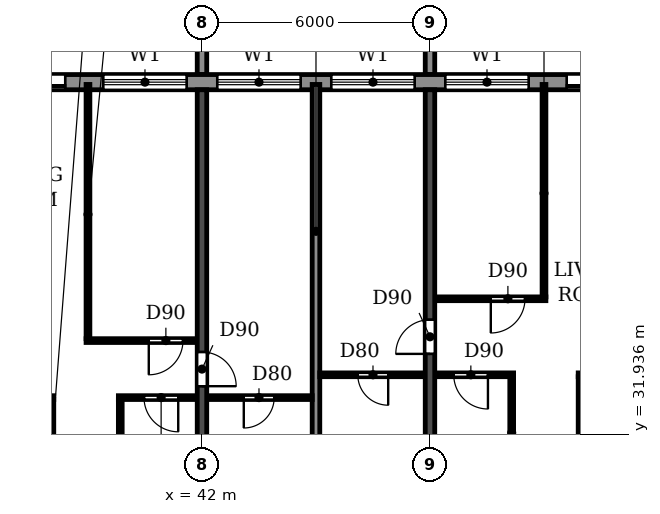
"""IFC4 building model, lengths in metres.
Left out: names, types, materials, properties, quantities, classifications, styles, units other than length and angle.
Written with IfcOpenShell. Run it as: python <this file> out.ifc"""

import sys

from ifc_helpers import new_model, si_unit, direction, frame, frame_2d, origin, place, context, subcontext, project, spatial, polyline, rectangle, outline, extrude, source, transform, mapped, element, fill, save


model = new_model("IFC4")
c1 = context("Model", 3, precision=1e-05, world=origin(), true_north=direction((0.0, 1.0)))
c2 = subcontext(c1, "Body", "Model", "MODEL_VIEW")
j1 = project(units=[si_unit("LENGTHUNIT", "METRE"), si_unit("PLANEANGLEUNIT", "RADIAN")], contexts=[c1])
p1 = place(None, origin())
s1 = spatial("IfcSite", under=j1, at=p1, CompositionType="ELEMENT")
p2 = place(p1, origin())
s2 = spatial("IfcBuilding", under=s1, at=p2, CompositionType="ELEMENT")
p3 = place(p2, frame((0.0, 0.0, 171.9)))
s3 = spatial("IfcBuildingStorey", under=s2, at=p3, CompositionType="ELEMENT", Elevation=171.9)
p4 = place(p3, frame((42.0, 30.5, 0.0), z_axis=(0.0, 0.0, 1.0), x_axis=(0.0, 1.0, 0.0)))
e1 = element("IfcWall", 1, at=p4, inside=s3, PredefinedType="SHEAR", context=c2, shape_type="SweptSolid", body=[
    extrude(rectangle(XDim=10.5, YDim=0.25, at=frame_2d((5.25, 0.0))), origin(), (0.0, 0.0, 1.0), 3.08),
])
p5 = place(p4, frame((2.7, 0.0, 0.0)))
e2 = element("IfcOpeningElement", 2, at=p5, cuts=e1, PredefinedType="OPENING", context=c2, shape_type="SweptSolid", body=[
    extrude(rectangle(XDim=0.9, YDim=2.1, at=frame_2d((0.45, 1.05))), frame((0.0, 0.135, 0.0), z_axis=(0.0, -1.0, 0.0), x_axis=(1.0, 0.0, 0.0)), (0.0, 0.0, 1.0), 0.27),
])
p6 = place(p3, frame((48.0, 30.5, 0.0), z_axis=(0.0, 0.0, 1.0), x_axis=(0.0, 1.0, 0.0)))
e3 = element("IfcWall", 3, at=p6, inside=s3, PredefinedType="SHEAR", context=c2, shape_type="SweptSolid", body=[
    extrude(rectangle(XDim=10.5, YDim=0.25, at=frame_2d((5.25, 0.0))), origin(), (0.0, 0.0, 1.0), 3.08),
])
p7 = place(p6, frame((3.55, 0.0, 0.0)))
e4 = element("IfcOpeningElement", 4, at=p7, cuts=e3, PredefinedType="OPENING", context=c2, shape_type="SweptSolid", body=[
    extrude(rectangle(XDim=0.9, YDim=2.1, at=frame_2d((0.45, 1.05))), frame((0.0, 0.135, 0.0), z_axis=(0.0, -1.0, 0.0), x_axis=(1.0, 0.0, 0.0)), (0.0, 0.0, 1.0), 0.27),
])
p8 = place(p3, frame((79.317, 41.2, 0.0), z_axis=(0.0, 0.0, 1.0), x_axis=(-1.0, 0.0, 0.0)))
e5 = element("IfcWall", 5, at=p8, inside=s3, PredefinedType="STANDARD", context=c2, shape_type="SweptSolid", body=[
    extrude(rectangle(XDim=56.634, YDim=0.4, at=frame_2d((28.317, 0.0))), origin(), (0.0, 0.0, 1.0), 3.08),
])
p9 = place(p8, frame((52.717, 0.0, 0.9)))
e6 = element("IfcOpeningElement", 6, at=p9, cuts=e5, PredefinedType="OPENING", context=c2, shape_type="SweptSolid", body=[
    extrude(rectangle(XDim=2.2, YDim=1.5, at=frame_2d((1.1, 0.75))), frame((0.0, 0.21, 0.0), z_axis=(0.0, -1.0, 0.0), x_axis=(1.0, 0.0, 0.0)), (0.0, 0.0, 1.0), 0.42),
])
p10 = place(p8, frame((49.917, 0.0, 0.0)))
e7 = element("IfcOpeningElement", 7, at=p10, cuts=e5, PredefinedType="OPENING", context=c2, shape_type="SweptSolid", body=[
    extrude(rectangle(XDim=1.8, YDim=2.4, at=frame_2d((0.9, 1.2))), frame((0.0, 0.21, 0.0), z_axis=(0.0, -1.0, 0.0), x_axis=(1.0, 0.0, 0.0)), (0.0, 0.0, 1.0), 0.42),
])
p11 = place(p8, frame((46.717, 0.0, 0.9)))
e8 = element("IfcOpeningElement", 8, at=p11, cuts=e5, PredefinedType="OPENING", context=c2, shape_type="SweptSolid", body=[
    extrude(rectangle(XDim=2.2, YDim=1.5, at=frame_2d((1.1, 0.75))), frame((0.0, 0.21, 0.0), z_axis=(0.0, -1.0, 0.0), x_axis=(1.0, 0.0, 0.0)), (0.0, 0.0, 1.0), 0.42),
])
p12 = place(p8, frame((43.717, 0.0, 0.9)))
e9 = element("IfcOpeningElement", 9, at=p12, cuts=e5, PredefinedType="OPENING", context=c2, shape_type="SweptSolid", body=[
    extrude(rectangle(XDim=2.2, YDim=1.5, at=frame_2d((1.1, 0.75))), frame((0.0, 0.21, 0.0), z_axis=(0.0, -1.0, 0.0), x_axis=(1.0, 0.0, 0.0)), (0.0, 0.0, 1.0), 0.42),
])
p13 = place(p8, frame((40.917, 0.0, 0.0)))
e10 = element("IfcOpeningElement", 10, at=p13, cuts=e5, PredefinedType="OPENING", context=c2, shape_type="SweptSolid", body=[
    extrude(rectangle(XDim=1.8, YDim=2.4, at=frame_2d((0.9, 1.2))), frame((0.0, 0.21, 0.0), z_axis=(0.0, -1.0, 0.0), x_axis=(1.0, 0.0, 0.0)), (0.0, 0.0, 1.0), 0.42),
])
p14 = place(p8, frame((37.717, 0.0, 0.9)))
e11 = element("IfcOpeningElement", 11, at=p14, cuts=e5, PredefinedType="OPENING", context=c2, shape_type="SweptSolid", body=[
    extrude(rectangle(XDim=2.2, YDim=1.5, at=frame_2d((1.1, 0.75))), frame((0.0, 0.21, 0.0), z_axis=(0.0, -1.0, 0.0), x_axis=(1.0, 0.0, 0.0)), (0.0, 0.0, 1.0), 0.42),
])
p15 = place(p8, frame((34.717, 0.0, 0.9)))
e12 = element("IfcOpeningElement", 12, at=p15, cuts=e5, PredefinedType="OPENING", context=c2, shape_type="SweptSolid", body=[
    extrude(rectangle(XDim=2.2, YDim=1.5, at=frame_2d((1.1, 0.75))), frame((0.0, 0.21, 0.0), z_axis=(0.0, -1.0, 0.0), x_axis=(1.0, 0.0, 0.0)), (0.0, 0.0, 1.0), 0.42),
])
p16 = place(p8, frame((31.717, 0.0, 0.9)))
e13 = element("IfcOpeningElement", 13, at=p16, cuts=e5, PredefinedType="OPENING", context=c2, shape_type="SweptSolid", body=[
    extrude(rectangle(XDim=2.2, YDim=1.5, at=frame_2d((1.1, 0.75))), frame((0.0, 0.21, 0.0), z_axis=(0.0, -1.0, 0.0), x_axis=(1.0, 0.0, 0.0)), (0.0, 0.0, 1.0), 0.42),
])
p17 = place(p8, frame((28.717, 0.0, 0.9)))
e14 = element("IfcOpeningElement", 14, at=p17, cuts=e5, PredefinedType="OPENING", context=c2, shape_type="SweptSolid", body=[
    extrude(rectangle(XDim=2.2, YDim=1.5, at=frame_2d((1.1, 0.75))), frame((0.0, 0.21, 0.0), z_axis=(0.0, -1.0, 0.0), x_axis=(1.0, 0.0, 0.0)), (0.0, 0.0, 1.0), 0.42),
])
p18 = place(p8, frame((25.917, 0.0, 0.0)))
e15 = element("IfcOpeningElement", 15, at=p18, cuts=e5, PredefinedType="OPENING", context=c2, shape_type="SweptSolid", body=[
    extrude(rectangle(XDim=1.8, YDim=2.4, at=frame_2d((0.9, 1.2))), frame((0.0, 0.21, 0.0), z_axis=(0.0, -1.0, 0.0), x_axis=(1.0, 0.0, 0.0)), (0.0, 0.0, 1.0), 0.42),
])
p19 = place(p8, frame((22.717, 0.0, 0.9)))
e16 = element("IfcOpeningElement", 16, at=p19, cuts=e5, PredefinedType="OPENING", context=c2, shape_type="SweptSolid", body=[
    extrude(rectangle(XDim=2.2, YDim=1.5, at=frame_2d((1.1, 0.75))), frame((0.0, 0.21, 0.0), z_axis=(0.0, -1.0, 0.0), x_axis=(1.0, 0.0, 0.0)), (0.0, 0.0, 1.0), 0.42),
])
p20 = place(p8, frame((19.917, 0.0, 0.0)))
e17 = element("IfcOpeningElement", 17, at=p20, cuts=e5, PredefinedType="OPENING", context=c2, shape_type="SweptSolid", body=[
    extrude(rectangle(XDim=1.8, YDim=2.4, at=frame_2d((0.9, 1.2))), frame((0.0, 0.21, 0.0), z_axis=(0.0, -1.0, 0.0), x_axis=(1.0, 0.0, 0.0)), (0.0, 0.0, 1.0), 0.42),
])
p21 = place(p8, frame((16.717, 0.0, 0.9)))
e18 = element("IfcOpeningElement", 18, at=p21, cuts=e5, PredefinedType="OPENING", context=c2, shape_type="SweptSolid", body=[
    extrude(rectangle(XDim=2.2, YDim=1.5, at=frame_2d((1.1, 0.75))), frame((0.0, 0.21, 0.0), z_axis=(0.0, -1.0, 0.0), x_axis=(1.0, 0.0, 0.0)), (0.0, 0.0, 1.0), 0.42),
])
p22 = place(p8, frame((13.717, 0.0, 0.9)))
e19 = element("IfcOpeningElement", 19, at=p22, cuts=e5, PredefinedType="OPENING", context=c2, shape_type="SweptSolid", body=[
    extrude(rectangle(XDim=2.2, YDim=1.5, at=frame_2d((1.1, 0.75))), frame((0.0, 0.21, 0.0), z_axis=(0.0, -1.0, 0.0), x_axis=(1.0, 0.0, 0.0)), (0.0, 0.0, 1.0), 0.42),
])
p23 = place(p8, frame((10.917, 0.0, 0.0)))
e20 = element("IfcOpeningElement", 20, at=p23, cuts=e5, PredefinedType="OPENING", context=c2, shape_type="SweptSolid", body=[
    extrude(rectangle(XDim=1.8, YDim=2.4, at=frame_2d((0.9, 1.2))), frame((0.0, 0.21, 0.0), z_axis=(0.0, -1.0, 0.0), x_axis=(1.0, 0.0, 0.0)), (0.0, 0.0, 1.0), 0.42),
])
p24 = place(p8, frame((7.717, 0.0, 0.9)))
e21 = element("IfcOpeningElement", 21, at=p24, cuts=e5, PredefinedType="OPENING", context=c2, shape_type="SweptSolid", body=[
    extrude(rectangle(XDim=2.2, YDim=1.5, at=frame_2d((1.1, 0.75))), frame((0.0, 0.21, 0.0), z_axis=(0.0, -1.0, 0.0), x_axis=(1.0, 0.0, 0.0)), (0.0, 0.0, 1.0), 0.42),
])
p25 = place(p8, frame((4.717, 0.0, 0.9)))
e22 = element("IfcOpeningElement", 22, at=p25, cuts=e5, PredefinedType="OPENING", context=c2, shape_type="SweptSolid", body=[
    extrude(rectangle(XDim=2.2, YDim=1.5, at=frame_2d((1.1, 0.75))), frame((0.0, 0.21, 0.0), z_axis=(0.0, -1.0, 0.0), x_axis=(1.0, 0.0, 0.0)), (0.0, 0.0, 1.0), 0.42),
])
p26 = place(p8, frame((1.917, 0.0, 0.0)))
e23 = element("IfcOpeningElement", 23, at=p26, cuts=e5, PredefinedType="OPENING", context=c2, shape_type="SweptSolid", body=[
    extrude(rectangle(XDim=1.8, YDim=2.4, at=frame_2d((0.9, 1.2))), frame((0.0, 0.21, 0.0), z_axis=(0.0, -1.0, 0.0), x_axis=(1.0, 0.0, 0.0)), (0.0, 0.0, 1.0), 0.42),
])
m1 = source(origin(), c2, "Body", "SweptSolid", [
    extrude(outline(polyline([(0.0, 0.0), (0.25, 0.0), (0.25, 3.1), (0.0, 3.1), (0.0, 0.0)])), origin(), (0.0, 0.0, 1.0), 3.1),
])
for number, where in (
    (24, (41.875, 41.4, 0.0)),
    (25, (47.875, 41.4, 0.0)),
):
    element("IfcWall", number, at=place(p3, frame(where)), inside=s3, PredefinedType="STANDARD", context=c2, shape_type="MappedRepresentation", body=[
        mapped(m1, transform((0.0, 0.0, 0.0))),
    ])
p27 = place(p3, frame((45.0, 30.51, 0.0), z_axis=(0.0, 0.0, 1.0), x_axis=(0.0, 1.0, 0.0)))
e26 = element("IfcWall", 26, at=p27, inside=s3, PredefinedType="PARTITIONING", context=c2, shape_type="SweptSolid", body=[
    extrude(rectangle(XDim=10.63, YDim=0.2, at=frame_2d((5.315, 0.0))), origin(), (0.0, 0.0, 1.0), 3.08),
])
p28 = place(p3, frame((36.135, 32.9, 0.0), z_axis=(0.0, 0.0, 1.0), x_axis=(1.0, 0.0, 0.0)))
e27 = element("IfcWall", 27, at=p28, inside=s3, PredefinedType="PARTITIONING", context=c2, shape_type="SweptSolid", body=[
    extrude(rectangle(XDim=1.965, YDim=0.1, at=frame_2d((0.982, 0.0))), origin(), (0.0, 0.0, 1.0), 3.08),
])
p29 = place(p28, frame((0.49, 0.0, 0.0)))
e28 = element("IfcOpeningElement", 28, at=p29, cuts=e27, PredefinedType="OPENING", context=c2, shape_type="SweptSolid", body=[
    extrude(rectangle(XDim=0.8, YDim=2.1, at=frame_2d((0.4, 1.05))), frame((0.0, 0.06, 0.0), z_axis=(0.0, -1.0, 0.0), x_axis=(1.0, 0.0, 0.0)), (0.0, 0.0, 1.0), 0.12),
])
p30 = place(p3, frame((39.8, 32.9, 0.0), z_axis=(0.0, 0.0, 1.0), x_axis=(1.0, 0.0, 0.0)))
e29 = element("IfcWall", 29, at=p30, inside=s3, PredefinedType="PARTITIONING", context=c2, shape_type="SweptSolid", body=[
    extrude(rectangle(XDim=2.065, YDim=0.1, at=frame_2d((1.032, 0.0))), origin(), (0.0, 0.0, 1.0), 3.08),
])
p31 = place(p30, frame((0.675, 0.0, 0.0)))
e30 = element("IfcOpeningElement", 30, at=p31, cuts=e29, PredefinedType="OPENING", context=c2, shape_type="SweptSolid", body=[
    extrude(rectangle(XDim=0.9, YDim=2.1, at=frame_2d((0.45, 1.05))), frame((0.0, 0.06, 0.0), z_axis=(0.0, -1.0, 0.0), x_axis=(1.0, 0.0, 0.0)), (0.0, 0.0, 1.0), 0.12),
])
p32 = place(p3, frame((42.135, 32.9, 0.0), z_axis=(0.0, 0.0, 1.0), x_axis=(1.0, 0.0, 0.0)))
e31 = element("IfcWall", 31, at=p32, inside=s3, PredefinedType="PARTITIONING", context=c2, shape_type="SweptSolid", body=[
    extrude(rectangle(XDim=2.765, YDim=0.1, at=frame_2d((1.382, 0.0))), origin(), (0.0, 0.0, 1.0), 3.08),
])
p33 = place(p32, frame((0.965, 0.0, 0.0)))
e32 = element("IfcOpeningElement", 32, at=p33, cuts=e31, PredefinedType="OPENING", context=c2, shape_type="SweptSolid", body=[
    extrude(rectangle(XDim=0.8, YDim=2.1, at=frame_2d((0.4, 1.05))), frame((0.0, 0.06, 0.0), z_axis=(0.0, -1.0, 0.0), x_axis=(1.0, 0.0, 0.0)), (0.0, 0.0, 1.0), 0.12),
])
p34 = place(p3, frame((45.1, 33.5, 0.0), z_axis=(0.0, 0.0, 1.0), x_axis=(1.0, 0.0, 0.0)))
e33 = element("IfcWall", 33, at=p34, inside=s3, PredefinedType="PARTITIONING", context=c2, shape_type="SweptSolid", body=[
    extrude(rectangle(XDim=2.765, YDim=0.1, at=frame_2d((1.382, 0.0))), origin(), (0.0, 0.0, 1.0), 3.08),
])
p35 = place(p34, frame((1.0, 0.0, 0.0)))
e34 = element("IfcOpeningElement", 34, at=p35, cuts=e33, PredefinedType="OPENING", context=c2, shape_type="SweptSolid", body=[
    extrude(rectangle(XDim=0.8, YDim=2.1, at=frame_2d((0.4, 1.05))), frame((0.0, 0.06, 0.0), z_axis=(0.0, -1.0, 0.0), x_axis=(1.0, 0.0, 0.0)), (0.0, 0.0, 1.0), 0.12),
])
p36 = place(p3, frame((48.135, 33.5, 0.0), z_axis=(0.0, 0.0, 1.0), x_axis=(1.0, 0.0, 0.0)))
e35 = element("IfcWall", 35, at=p36, inside=s3, PredefinedType="PARTITIONING", context=c2, shape_type="SweptSolid", body=[
    extrude(rectangle(XDim=2.065, YDim=0.1, at=frame_2d((1.032, 0.0))), origin(), (0.0, 0.0, 1.0), 3.08),
])
p37 = place(p36, frame((0.49, 0.0, 0.0)))
e36 = element("IfcOpeningElement", 36, at=p37, cuts=e35, PredefinedType="OPENING", context=c2, shape_type="SweptSolid", body=[
    extrude(rectangle(XDim=0.9, YDim=2.1, at=frame_2d((0.45, 1.05))), frame((0.0, 0.06, 0.0), z_axis=(0.0, -1.0, 0.0), x_axis=(1.0, 0.0, 0.0)), (0.0, 0.0, 1.0), 0.12),
])
p38 = place(p3, frame((51.9, 33.5, 0.0), z_axis=(0.0, 0.0, 1.0), x_axis=(1.0, 0.0, 0.0)))
e37 = element("IfcWall", 37, at=p38, inside=s3, PredefinedType="PARTITIONING", context=c2, shape_type="SweptSolid", body=[
    extrude(rectangle(XDim=1.965, YDim=0.1, at=frame_2d((0.982, 0.0))), origin(), (0.0, 0.0, 1.0), 3.08),
])
p39 = place(p38, frame((0.675, 0.0, 0.0)))
e38 = element("IfcOpeningElement", 38, at=p39, cuts=e37, PredefinedType="OPENING", context=c2, shape_type="SweptSolid", body=[
    extrude(rectangle(XDim=0.8, YDim=2.1, at=frame_2d((0.4, 1.05))), frame((0.0, 0.06, 0.0), z_axis=(0.0, -1.0, 0.0), x_axis=(1.0, 0.0, 0.0)), (0.0, 0.0, 1.0), 0.12),
])
p40 = place(p3, frame((38.95, 34.4, 0.0), z_axis=(0.0, 0.0, 1.0), x_axis=(1.0, 0.0, 0.0)))
e39 = element("IfcWall", 39, at=p40, inside=s3, PredefinedType="PARTITIONING", context=c2, shape_type="SweptSolid", body=[
    extrude(rectangle(XDim=2.915, YDim=0.1, at=frame_2d((1.458, 0.0))), origin(), (0.0, 0.0, 1.0), 3.08),
])
p41 = place(p40, frame((1.65, 0.0, 0.0)))
e40 = element("IfcOpeningElement", 40, at=p41, cuts=e39, PredefinedType="OPENING", context=c2, shape_type="SweptSolid", body=[
    extrude(rectangle(XDim=0.9, YDim=2.1, at=frame_2d((0.45, 1.05))), frame((0.0, 0.06, 0.0), z_axis=(0.0, -1.0, 0.0), x_axis=(1.0, 0.0, 0.0)), (0.0, 0.0, 1.0), 0.12),
])
p42 = place(p3, frame((48.135, 35.5, 0.0), z_axis=(0.0, 0.0, 1.0), x_axis=(1.0, 0.0, 0.0)))
e41 = element("IfcWall", 41, at=p42, inside=s3, PredefinedType="PARTITIONING", context=c2, shape_type="SweptSolid", body=[
    extrude(rectangle(XDim=2.915, YDim=0.1, at=frame_2d((1.458, 0.0))), origin(), (0.0, 0.0, 1.0), 3.08),
])
p43 = place(p42, frame((1.465, 0.0, 0.0)))
e42 = element("IfcOpeningElement", 42, at=p43, cuts=e41, PredefinedType="OPENING", context=c2, shape_type="SweptSolid", body=[
    extrude(rectangle(XDim=0.9, YDim=2.1, at=frame_2d((0.45, 1.05))), frame((0.0, 0.06, 0.0), z_axis=(0.0, -1.0, 0.0), x_axis=(1.0, 0.0, 0.0)), (0.0, 0.0, 1.0), 0.12),
])
p44 = place(p3, frame((38.05, 30.51, 0.0), z_axis=(0.0, 0.0, 1.0), x_axis=(0.0, 1.0, 0.0)))
e43 = element("IfcWall", 43, at=p44, inside=s3, PredefinedType="PARTITIONING", context=c2, shape_type="SweptSolid", body=[
    extrude(rectangle(XDim=2.34, YDim=0.1, at=frame_2d((1.17, 0.0))), origin(), (0.0, 0.0, 1.0), 3.08),
])
p45 = place(p3, frame((39.0, 34.45, 0.0), z_axis=(0.0, 0.0, 1.0), x_axis=(0.0, 1.0, 0.0)))
e44 = element("IfcWall", 44, at=p45, inside=s3, PredefinedType="PARTITIONING", context=c2, shape_type="SweptSolid", body=[
    extrude(rectangle(XDim=6.69, YDim=0.1, at=frame_2d((3.345, 0.0))), origin(), (0.0, 0.0, 1.0), 3.08),
])
p46 = place(p3, frame((39.85, 30.51, 0.0), z_axis=(0.0, 0.0, 1.0), x_axis=(0.0, 1.0, 0.0)))
e45 = element("IfcWall", 45, at=p46, inside=s3, PredefinedType="PARTITIONING", context=c2, shape_type="SweptSolid", body=[
    extrude(rectangle(XDim=2.34, YDim=0.1, at=frame_2d((1.17, 0.0))), origin(), (0.0, 0.0, 1.0), 3.08),
])
p47 = place(p3, frame((50.15, 30.51, 0.0), z_axis=(0.0, 0.0, 1.0), x_axis=(0.0, 1.0, 0.0)))
e46 = element("IfcWall", 46, at=p47, inside=s3, PredefinedType="PARTITIONING", context=c2, shape_type="SweptSolid", body=[
    extrude(rectangle(XDim=2.94, YDim=0.1, at=frame_2d((1.47, 0.0))), origin(), (0.0, 0.0, 1.0), 3.08),
])
p48 = place(p3, frame((51.0, 35.55, 0.0), z_axis=(0.0, 0.0, 1.0), x_axis=(0.0, 1.0, 0.0)))
e47 = element("IfcWall", 47, at=p48, inside=s3, PredefinedType="PARTITIONING", context=c2, shape_type="SweptSolid", body=[
    extrude(rectangle(XDim=5.59, YDim=0.1, at=frame_2d((2.795, 0.0))), origin(), (0.0, 0.0, 1.0), 3.08),
])
p49 = place(p3, frame((51.95, 30.51, 0.0), z_axis=(0.0, 0.0, 1.0), x_axis=(0.0, 1.0, 0.0)))
e48 = element("IfcWall", 48, at=p49, inside=s3, PredefinedType="PARTITIONING", context=c2, shape_type="SweptSolid", body=[
    extrude(rectangle(XDim=2.94, YDim=0.1, at=frame_2d((1.47, 0.0))), origin(), (0.0, 0.0, 1.0), 3.08),
])
p50 = place(p13, origin())
e49 = element("IfcDoor", 49, at=p50, inside=s3, OperationType="DOUBLE_DOOR_SLIDING", PredefinedType="DOOR", context=c2, shape_type="SweptSolid", body=[
    extrude(rectangle(XDim=1.8, YDim=2.4, at=frame_2d((0.9, 1.2))), frame((0.0, 0.025, 0.0), z_axis=(0.0, -1.0, 0.0), x_axis=(1.0, 0.0, 0.0)), (0.0, 0.0, 1.0), 0.05),
])
fill(e10, e49)
p51 = place(p14, origin())
e50 = element("IfcWindow", 50, at=p51, inside=s3, PartitioningType="DOUBLE_PANEL_HORIZONTAL", PredefinedType="WINDOW", context=c2, shape_type="SweptSolid", body=[
    extrude(rectangle(XDim=2.2, YDim=1.5, at=frame_2d((1.1, 0.75))), frame((0.0, 0.03, 0.0), z_axis=(0.0, -1.0, 0.0), x_axis=(1.0, 0.0, 0.0)), (0.0, 0.0, 1.0), 0.06),
])
fill(e11, e50)
p52 = place(p15, origin())
e51 = element("IfcWindow", 51, at=p52, inside=s3, PartitioningType="DOUBLE_PANEL_HORIZONTAL", PredefinedType="WINDOW", context=c2, shape_type="SweptSolid", body=[
    extrude(rectangle(XDim=2.2, YDim=1.5, at=frame_2d((1.1, 0.75))), frame((0.0, 0.03, 0.0), z_axis=(0.0, -1.0, 0.0), x_axis=(1.0, 0.0, 0.0)), (0.0, 0.0, 1.0), 0.06),
])
fill(e12, e51)
p53 = place(p16, origin())
e52 = element("IfcWindow", 52, at=p53, inside=s3, PartitioningType="DOUBLE_PANEL_HORIZONTAL", PredefinedType="WINDOW", context=c2, shape_type="SweptSolid", body=[
    extrude(rectangle(XDim=2.2, YDim=1.5, at=frame_2d((1.1, 0.75))), frame((0.0, 0.03, 0.0), z_axis=(0.0, -1.0, 0.0), x_axis=(1.0, 0.0, 0.0)), (0.0, 0.0, 1.0), 0.06),
])
fill(e13, e52)
p54 = place(p17, origin())
e53 = element("IfcWindow", 53, at=p54, inside=s3, PartitioningType="DOUBLE_PANEL_HORIZONTAL", PredefinedType="WINDOW", context=c2, shape_type="SweptSolid", body=[
    extrude(rectangle(XDim=2.2, YDim=1.5, at=frame_2d((1.1, 0.75))), frame((0.0, 0.03, 0.0), z_axis=(0.0, -1.0, 0.0), x_axis=(1.0, 0.0, 0.0)), (0.0, 0.0, 1.0), 0.06),
])
fill(e14, e53)
p55 = place(p18, origin())
e54 = element("IfcDoor", 54, at=p55, inside=s3, OperationType="DOUBLE_DOOR_SLIDING", PredefinedType="DOOR", context=c2, shape_type="SweptSolid", body=[
    extrude(rectangle(XDim=1.8, YDim=2.4, at=frame_2d((0.9, 1.2))), frame((0.0, 0.025, 0.0), z_axis=(0.0, -1.0, 0.0), x_axis=(1.0, 0.0, 0.0)), (0.0, 0.0, 1.0), 0.05),
])
fill(e15, e54)
p56 = place(p33, frame((0.8, 0.0, 0.0), z_axis=(0.0, 0.0, 1.0), x_axis=(-1.0, 0.0, 0.0)))
e55 = element("IfcDoor", 55, at=p56, inside=s3, OperationType="SINGLE_SWING_RIGHT", PredefinedType="DOOR", context=c2, shape_type="SweptSolid", body=[
    extrude(rectangle(XDim=0.8, YDim=2.1, at=frame_2d((0.4, 1.05))), frame((0.0, 0.025, 0.0), z_axis=(0.0, -1.0, 0.0), x_axis=(1.0, 0.0, 0.0)), (0.0, 0.0, 1.0), 0.05),
])
fill(e32, e55)
p57 = place(p31, frame((0.9, 0.0, 0.0), z_axis=(0.0, 0.0, 1.0), x_axis=(-1.0, 0.0, 0.0)))
e56 = element("IfcDoor", 56, at=p57, inside=s3, OperationType="SINGLE_SWING_LEFT", PredefinedType="DOOR", context=c2, shape_type="SweptSolid", body=[
    extrude(rectangle(XDim=0.9, YDim=2.1, at=frame_2d((0.45, 1.05))), frame((0.0, 0.025, 0.0), z_axis=(0.0, -1.0, 0.0), x_axis=(1.0, 0.0, 0.0)), (0.0, 0.0, 1.0), 0.05),
])
fill(e30, e56)
p58 = place(p41, frame((0.9, 0.0, 0.0), z_axis=(0.0, 0.0, 1.0), x_axis=(-1.0, 0.0, 0.0)))
e57 = element("IfcDoor", 57, at=p58, inside=s3, OperationType="SINGLE_SWING_RIGHT", PredefinedType="DOOR", context=c2, shape_type="SweptSolid", body=[
    extrude(rectangle(XDim=0.9, YDim=2.1, at=frame_2d((0.45, 1.05))), frame((0.0, 0.025, 0.0), z_axis=(0.0, -1.0, 0.0), x_axis=(1.0, 0.0, 0.0)), (0.0, 0.0, 1.0), 0.05),
])
fill(e40, e57)
p59 = place(p5, frame((0.9, 0.0, 0.0), z_axis=(0.0, 0.0, 1.0), x_axis=(-1.0, 0.0, 0.0)))
e58 = element("IfcDoor", 58, at=p59, inside=s3, OperationType="SINGLE_SWING_RIGHT", PredefinedType="DOOR", context=c2, shape_type="SweptSolid", body=[
    extrude(rectangle(XDim=0.9, YDim=2.1, at=frame_2d((0.45, 1.05))), frame((0.0, 0.025, 0.0), z_axis=(0.0, -1.0, 0.0), x_axis=(1.0, 0.0, 0.0)), (0.0, 0.0, 1.0), 0.05),
])
fill(e2, e58)
p60 = place(p35, frame((0.8, 0.0, 0.0), z_axis=(0.0, 0.0, 1.0), x_axis=(-1.0, 0.0, 0.0)))
e59 = element("IfcDoor", 59, at=p60, inside=s3, OperationType="SINGLE_SWING_LEFT", PredefinedType="DOOR", context=c2, shape_type="SweptSolid", body=[
    extrude(rectangle(XDim=0.8, YDim=2.1, at=frame_2d((0.4, 1.05))), frame((0.0, 0.025, 0.0), z_axis=(0.0, -1.0, 0.0), x_axis=(1.0, 0.0, 0.0)), (0.0, 0.0, 1.0), 0.05),
])
fill(e34, e59)
p61 = place(p7, origin())
e60 = element("IfcDoor", 60, at=p61, inside=s3, OperationType="SINGLE_SWING_LEFT", PredefinedType="DOOR", context=c2, shape_type="SweptSolid", body=[
    extrude(rectangle(XDim=0.9, YDim=2.1, at=frame_2d((0.45, 1.05))), frame((0.0, 0.025, 0.0), z_axis=(0.0, -1.0, 0.0), x_axis=(1.0, 0.0, 0.0)), (0.0, 0.0, 1.0), 0.05),
])
fill(e4, e60)
p62 = place(p37, frame((0.9, 0.0, 0.0), z_axis=(0.0, 0.0, 1.0), x_axis=(-1.0, 0.0, 0.0)))
e61 = element("IfcDoor", 61, at=p62, inside=s3, OperationType="SINGLE_SWING_LEFT", PredefinedType="DOOR", context=c2, shape_type="SweptSolid", body=[
    extrude(rectangle(XDim=0.9, YDim=2.1, at=frame_2d((0.45, 1.05))), frame((0.0, 0.025, 0.0), z_axis=(0.0, -1.0, 0.0), x_axis=(1.0, 0.0, 0.0)), (0.0, 0.0, 1.0), 0.05),
])
fill(e36, e61)
p63 = place(p43, frame((0.9, 0.0, 0.0), z_axis=(0.0, 0.0, 1.0), x_axis=(-1.0, 0.0, 0.0)))
e62 = element("IfcDoor", 62, at=p63, inside=s3, OperationType="SINGLE_SWING_RIGHT", PredefinedType="DOOR", context=c2, shape_type="SweptSolid", body=[
    extrude(rectangle(XDim=0.9, YDim=2.1, at=frame_2d((0.45, 1.05))), frame((0.0, 0.025, 0.0), z_axis=(0.0, -1.0, 0.0), x_axis=(1.0, 0.0, 0.0)), (0.0, 0.0, 1.0), 0.05),
])
fill(e42, e62)
save(model, sys.argv[1])
